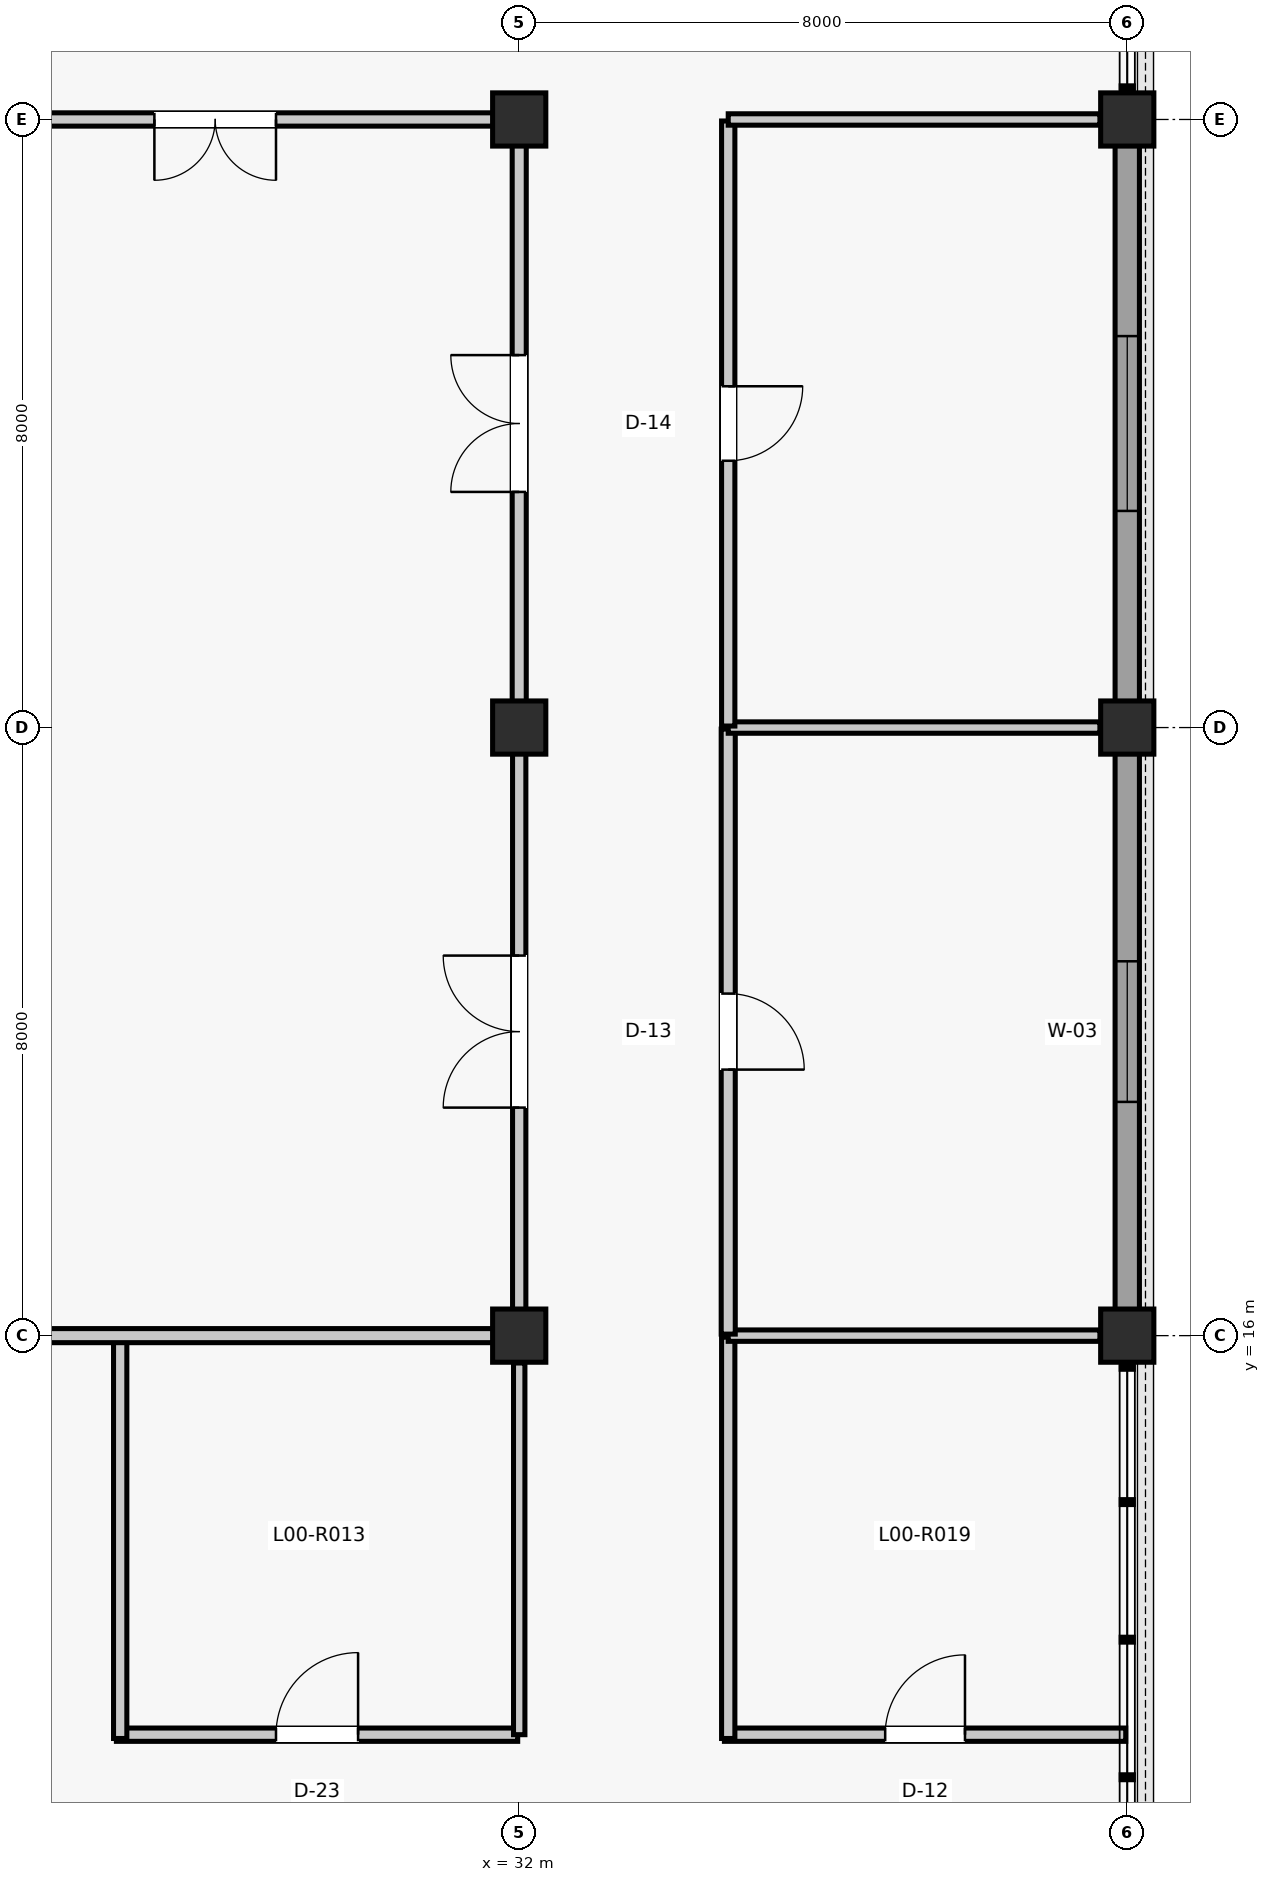
"""IFC4 building model, lengths in metres.
Left out: names, types, materials, properties, quantities, classifications, styles, units other than length and angle.
Written with IfcOpenShell. Run it as: python <this file> out.ifc"""

import sys

from ifc_helpers import new_model, si_unit, direction, frame, frame_2d, origin, origin_2d, place, context, subcontext, project, spatial, rectangle, extrude, element, fill, save


model = new_model("IFC4")
c1 = context("Model", 3, precision=1e-05, world=origin(), true_north=direction((0.0, 1.0)))
c2 = subcontext(c1, "Body", "Model", "MODEL_VIEW")
j1 = project(units=[si_unit("LENGTHUNIT", "METRE"), si_unit("PLANEANGLEUNIT", "RADIAN")], contexts=[c1])
p1 = place(None, origin())
s1 = spatial("IfcSite", under=j1, at=p1, CompositionType="ELEMENT")
p2 = place(p1, origin())
s2 = spatial("IfcBuilding", under=s1, at=p2, CompositionType="ELEMENT")
p3 = place(p2, origin())
s3 = spatial("IfcBuildingStorey", under=s2, at=p3, CompositionType="ELEMENT", Elevation=0.0)
for number, where, z_axis, x_axis in (
    (1, (32.0, 16.0, 0.0), (0.0, 0.0, 1.0), (1.0, 0.0, 0.0)),
    (2, (32.0, 24.0, 0.0), (0.0, 0.0, 1.0), (1.0, 0.0, 0.0)),
    (3, (32.0, 32.0, 0.0), (0.0, 0.0, 1.0), (1.0, 0.0, 0.0)),
    (4, (40.0, 16.0, 0.0), (0.0, 0.0, 1.0), (1.0, 0.0, 0.0)),
    (5, (40.0, 24.0, 0.0), (0.0, 0.0, 1.0), (1.0, 0.0, 0.0)),
    (6, (40.0, 32.0, 0.0), (0.0, 0.0, 1.0), (1.0, 0.0, 0.0)),
):
    element("IfcColumn", number, at=place(p3, frame(where, z_axis=z_axis, x_axis=x_axis)), inside=s3, PredefinedType="COLUMN", context=c2, shape_type="SweptSolid", body=[
        extrude(rectangle(XDim=0.7, YDim=0.7, at=origin_2d()), origin(), (0.0, 0.0, 1.0), 5.28),
    ])
p4 = place(p3, frame((40.0, 16.335, 0.0), z_axis=(0.0, 0.0, 1.0), x_axis=(0.0, 1.0, 0.0)))
e7 = element("IfcWall", 7, at=p4, inside=s3, PredefinedType="SOLIDWALL", context=c2, shape_type="SweptSolid", body=[
    extrude(rectangle(XDim=7.33, YDim=0.32, at=frame_2d((3.665, 0.0))), origin(), (0.0, 0.0, 1.0), 4.677),
])
p5 = place(p4, frame((2.74, 0.0, 0.9)))
e8 = element("IfcOpeningElement", 8, at=p5, cuts=e7, PredefinedType="OPENING", context=c2, shape_type="SweptSolid", body=[
    extrude(rectangle(XDim=1.85, YDim=2.65, at=frame_2d((0.925, 1.325))), frame((0.0, 0.17, 0.0), z_axis=(0.0, -1.0, 0.0), x_axis=(1.0, 0.0, 0.0)), (0.0, 0.0, 1.0), 0.34),
])
p6 = place(p3, frame((40.0, 24.335, 0.0), z_axis=(0.0, 0.0, 1.0), x_axis=(0.0, 1.0, 0.0)))
e9 = element("IfcWall", 9, at=p6, inside=s3, PredefinedType="SOLIDWALL", context=c2, shape_type="SweptSolid", body=[
    extrude(rectangle(XDim=7.33, YDim=0.32, at=frame_2d((3.665, 0.0))), origin(), (0.0, 0.0, 1.0), 4.61),
])
p7 = place(p6, frame((2.515, 0.0, 0.9)))
e10 = element("IfcOpeningElement", 10, at=p7, cuts=e9, PredefinedType="OPENING", context=c2, shape_type="SweptSolid", body=[
    extrude(rectangle(XDim=2.3, YDim=2.55, at=frame_2d((1.15, 1.275))), frame((0.0, 0.17, 0.0), z_axis=(0.0, -1.0, 0.0), x_axis=(1.0, 0.0, 0.0)), (0.0, 0.0, 1.0), 0.34),
])
p8 = place(p3, frame((26.7, 10.75, 0.0), z_axis=(0.0, 0.0, 1.0), x_axis=(1.0, 0.0, 0.0)))
e11 = element("IfcWall", 11, at=p8, inside=s3, PredefinedType="PARTITIONING", context=c2, shape_type="SweptSolid", body=[
    extrude(rectangle(XDim=5.28, YDim=0.175, at=frame_2d((2.64, 0.0))), origin(), (0.0, 0.0, 1.0), 4.412),
])
p9 = place(p8, frame((2.1, 0.0, 0.0)))
e12 = element("IfcOpeningElement", 12, at=p9, cuts=e11, PredefinedType="OPENING", context=c2, shape_type="SweptSolid", body=[
    extrude(rectangle(XDim=1.08, YDim=2.2, at=frame_2d((0.54, 1.1))), frame((0.0, 0.097, 0.0), z_axis=(0.0, -1.0, 0.0), x_axis=(1.0, 0.0, 0.0)), (0.0, 0.0, 1.0), 0.195),
])
p10 = place(p3, frame((26.75, 10.7, 0.0), z_axis=(0.0, 0.0, 1.0), x_axis=(0.0, 1.0, 0.0)))
e13 = element("IfcWall", 13, at=p10, inside=s3, PredefinedType="PARTITIONING", context=c2, shape_type="SweptSolid", body=[
    extrude(rectangle(XDim=5.28, YDim=0.175, at=frame_2d((2.64, 0.0))), origin(), (0.0, 0.0, 1.0), 4.667),
])
p11 = place(p3, frame((32.0, 10.75, 0.0), z_axis=(0.0, 0.0, 1.0), x_axis=(0.0, 1.0, 0.0)))
e14 = element("IfcWall", 14, at=p11, inside=s3, PredefinedType="PARTITIONING", context=c2, shape_type="SweptSolid", body=[
    extrude(rectangle(XDim=4.89, YDim=0.15, at=frame_2d((2.445, 0.0))), origin(), (0.0, 0.0, 1.0), 4.412),
])
p12 = place(p3, frame((34.7, 10.75, 0.0), z_axis=(0.0, 0.0, 1.0), x_axis=(1.0, 0.0, 0.0)))
e15 = element("IfcWall", 15, at=p12, inside=s3, PredefinedType="PARTITIONING", context=c2, shape_type="SweptSolid", body=[
    extrude(rectangle(XDim=5.28, YDim=0.175, at=frame_2d((2.64, 0.0))), origin(), (0.0, 0.0, 1.0), 4.607),
])
p13 = place(p12, frame((2.115, 0.0, 0.0)))
e16 = element("IfcOpeningElement", 16, at=p13, cuts=e15, PredefinedType="OPENING", context=c2, shape_type="SweptSolid", body=[
    extrude(rectangle(XDim=1.05, YDim=2.15, at=frame_2d((0.525, 1.075))), frame((0.0, 0.097, 0.0), z_axis=(0.0, -1.0, 0.0), x_axis=(1.0, 0.0, 0.0)), (0.0, 0.0, 1.0), 0.195),
])
p14 = place(p3, frame((34.75, 10.7, 0.0), z_axis=(0.0, 0.0, 1.0), x_axis=(0.0, 1.0, 0.0)))
e17 = element("IfcWall", 17, at=p14, inside=s3, PredefinedType="PARTITIONING", context=c2, shape_type="SweptSolid", body=[
    extrude(rectangle(XDim=5.28, YDim=0.175, at=frame_2d((2.64, 0.0))), origin(), (0.0, 0.0, 1.0), 4.336),
])
p15 = place(p3, frame((34.75, 16.0, 0.0), z_axis=(0.0, 0.0, 1.0), x_axis=(1.0, 0.0, 0.0)))
e18 = element("IfcWall", 18, at=p15, inside=s3, PredefinedType="PARTITIONING", context=c2, shape_type="SweptSolid", body=[
    extrude(rectangle(XDim=4.89, YDim=0.15, at=frame_2d((2.445, 0.0))), origin(), (0.0, 0.0, 1.0), 4.336),
])
p16 = place(p3, frame((34.75, 16.02, 0.0), z_axis=(0.0, 0.0, 1.0), x_axis=(0.0, 1.0, 0.0)))
e19 = element("IfcWall", 19, at=p16, inside=s3, PredefinedType="PARTITIONING", context=c2, shape_type="SweptSolid", body=[
    extrude(rectangle(XDim=7.96, YDim=0.185, at=frame_2d((3.98, 0.0))), origin(), (0.0, 0.0, 1.0), 4.336),
])
p17 = place(p16, frame((3.48, 0.0, 0.0)))
e20 = element("IfcOpeningElement", 20, at=p17, cuts=e19, PredefinedType="OPENING", context=c2, shape_type="SweptSolid", body=[
    extrude(rectangle(XDim=1.0, YDim=2.15, at=frame_2d((0.5, 1.075))), frame((0.0, 0.103, 0.0), z_axis=(0.0, -1.0, 0.0), x_axis=(1.0, 0.0, 0.0)), (0.0, 0.0, 1.0), 0.205),
])
p18 = place(p3, frame((34.75, 24.0, 0.0), z_axis=(0.0, 0.0, 1.0), x_axis=(1.0, 0.0, 0.0)))
e21 = element("IfcWall", 21, at=p18, inside=s3, PredefinedType="PARTITIONING", context=c2, shape_type="SweptSolid", body=[
    extrude(rectangle(XDim=4.89, YDim=0.15, at=frame_2d((2.445, 0.0))), origin(), (0.0, 0.0, 1.0), 4.404),
])
p19 = place(p3, frame((34.75, 24.02, 0.0), z_axis=(0.0, 0.0, 1.0), x_axis=(0.0, 1.0, 0.0)))
e22 = element("IfcWall", 22, at=p19, inside=s3, PredefinedType="PARTITIONING", context=c2, shape_type="SweptSolid", body=[
    extrude(rectangle(XDim=7.96, YDim=0.175, at=frame_2d((3.98, 0.0))), origin(), (0.0, 0.0, 1.0), 4.327),
])
p20 = place(p19, frame((3.49, 0.0, 0.0)))
e23 = element("IfcOpeningElement", 23, at=p20, cuts=e22, PredefinedType="OPENING", context=c2, shape_type="SweptSolid", body=[
    extrude(rectangle(XDim=0.98, YDim=2.15, at=frame_2d((0.49, 1.075))), frame((0.0, 0.097, 0.0), z_axis=(0.0, -1.0, 0.0), x_axis=(1.0, 0.0, 0.0)), (0.0, 0.0, 1.0), 0.195),
])
p21 = place(p3, frame((34.75, 32.0, 0.0), z_axis=(0.0, 0.0, 1.0), x_axis=(1.0, 0.0, 0.0)))
e24 = element("IfcWall", 24, at=p21, inside=s3, PredefinedType="PARTITIONING", context=c2, shape_type="SweptSolid", body=[
    extrude(rectangle(XDim=4.89, YDim=0.15, at=frame_2d((2.445, 0.0))), origin(), (0.0, 0.0, 1.0), 4.327),
])
p22 = place(p3, frame((24.34, 16.0, 0.0), z_axis=(0.0, 0.0, 1.0), x_axis=(1.0, 0.0, 0.0)))
e25 = element("IfcWall", 25, at=p22, inside=s3, PredefinedType="PARTITIONING", context=c2, shape_type="SweptSolid", body=[
    extrude(rectangle(XDim=7.32, YDim=0.185, at=frame_2d((3.66, 0.0))), origin(), (0.0, 0.0, 1.0), 4.667),
])
p23 = place(p22, frame((0.52, 0.0, 0.0)))
e26 = element("IfcOpeningElement", 26, at=p23, cuts=e25, PredefinedType="OPENING", context=c2, shape_type="SweptSolid", body=[
    extrude(rectangle(XDim=0.94, YDim=2.12, at=frame_2d((0.47, 1.06))), frame((0.0, 0.103, 0.0), z_axis=(0.0, -1.0, 0.0), x_axis=(1.0, 0.0, 0.0)), (0.0, 0.0, 1.0), 0.205),
])
p24 = place(p3, frame((32.0, 16.34, 0.0), z_axis=(0.0, 0.0, 1.0), x_axis=(0.0, 1.0, 0.0)))
e27 = element("IfcWall", 27, at=p24, inside=s3, PredefinedType="PARTITIONING", context=c2, shape_type="SweptSolid", body=[
    extrude(rectangle(XDim=7.32, YDim=0.175, at=frame_2d((3.66, 0.0))), origin(), (0.0, 0.0, 1.0), 4.607),
])
p25 = place(p24, frame((2.66, 0.0, 0.0)))
e28 = element("IfcOpeningElement", 28, at=p25, cuts=e27, PredefinedType="OPENING", context=c2, shape_type="SweptSolid", body=[
    extrude(rectangle(XDim=2.0, YDim=2.4, at=frame_2d((1.0, 1.2))), frame((0.0, 0.097, 0.0), z_axis=(0.0, -1.0, 0.0), x_axis=(1.0, 0.0, 0.0)), (0.0, 0.0, 1.0), 0.195),
])
p26 = place(p3, frame((32.0, 24.34, 0.0), z_axis=(0.0, 0.0, 1.0), x_axis=(0.0, 1.0, 0.0)))
e29 = element("IfcWall", 29, at=p26, inside=s3, PredefinedType="PARTITIONING", context=c2, shape_type="SweptSolid", body=[
    extrude(rectangle(XDim=7.32, YDim=0.185, at=frame_2d((3.66, 0.0))), origin(), (0.0, 0.0, 1.0), 4.67),
])
p27 = place(p26, frame((2.76, 0.0, 0.0)))
e30 = element("IfcOpeningElement", 30, at=p27, cuts=e29, PredefinedType="OPENING", context=c2, shape_type="SweptSolid", body=[
    extrude(rectangle(XDim=1.8, YDim=2.35, at=frame_2d((0.9, 1.175))), frame((0.0, 0.103, 0.0), z_axis=(0.0, -1.0, 0.0), x_axis=(1.0, 0.0, 0.0)), (0.0, 0.0, 1.0), 0.205),
])
p28 = place(p3, frame((24.34, 32.0, 0.0), z_axis=(0.0, 0.0, 1.0), x_axis=(1.0, 0.0, 0.0)))
e31 = element("IfcWall", 31, at=p28, inside=s3, PredefinedType="PARTITIONING", context=c2, shape_type="SweptSolid", body=[
    extrude(rectangle(XDim=7.32, YDim=0.175, at=frame_2d((3.66, 0.0))), origin(), (0.0, 0.0, 1.0), 4.67),
])
p29 = place(p28, frame((2.86, 0.0, 0.0)))
e32 = element("IfcOpeningElement", 32, at=p29, cuts=e31, PredefinedType="OPENING", context=c2, shape_type="SweptSolid", body=[
    extrude(rectangle(XDim=1.6, YDim=2.25, at=frame_2d((0.8, 1.125))), frame((0.0, 0.097, 0.0), z_axis=(0.0, -1.0, 0.0), x_axis=(1.0, 0.0, 0.0)), (0.0, 0.0, 1.0), 0.195),
])
p30 = place(p5, origin())
e33 = element("IfcWindow", 33, at=p30, inside=s3, PartitioningType="SINGLE_PANEL", PredefinedType="WINDOW", context=c2, shape_type="SweptSolid", body=[
    extrude(rectangle(XDim=1.85, YDim=2.65, at=frame_2d((0.925, 1.325))), frame((0.0, 0.03, 0.0), z_axis=(0.0, -1.0, 0.0), x_axis=(1.0, 0.0, 0.0)), (0.0, 0.0, 1.0), 0.06),
])
fill(e8, e33)
p31 = place(p7, origin())
e34 = element("IfcWindow", 34, at=p31, inside=s3, PartitioningType="SINGLE_PANEL", PredefinedType="WINDOW", context=c2, shape_type="SweptSolid", body=[
    extrude(rectangle(XDim=2.3, YDim=2.55, at=frame_2d((1.15, 1.275))), frame((0.0, 0.03, 0.0), z_axis=(0.0, -1.0, 0.0), x_axis=(1.0, 0.0, 0.0)), (0.0, 0.0, 1.0), 0.06),
])
fill(e10, e34)
p32 = place(p9, origin())
e35 = element("IfcDoor", 35, at=p32, inside=s3, OperationType="SINGLE_SWING_RIGHT", PredefinedType="DOOR", context=c2, shape_type="SweptSolid", body=[
    extrude(rectangle(XDim=1.08, YDim=2.2, at=frame_2d((0.54, 1.1))), frame((0.0, 0.025, 0.0), z_axis=(0.0, -1.0, 0.0), x_axis=(1.0, 0.0, 0.0)), (0.0, 0.0, 1.0), 0.05),
])
fill(e12, e35)
p33 = place(p13, origin())
e36 = element("IfcDoor", 36, at=p33, inside=s3, OperationType="SINGLE_SWING_RIGHT", PredefinedType="DOOR", context=c2, shape_type="SweptSolid", body=[
    extrude(rectangle(XDim=1.05, YDim=2.15, at=frame_2d((0.525, 1.075))), frame((0.0, 0.025, 0.0), z_axis=(0.0, -1.0, 0.0), x_axis=(1.0, 0.0, 0.0)), (0.0, 0.0, 1.0), 0.05),
])
fill(e16, e36)
p34 = place(p17, frame((1.0, 0.0, 0.0), z_axis=(0.0, 0.0, 1.0), x_axis=(-1.0, 0.0, 0.0)))
e37 = element("IfcDoor", 37, at=p34, inside=s3, OperationType="SINGLE_SWING_LEFT", PredefinedType="DOOR", context=c2, shape_type="SweptSolid", body=[
    extrude(rectangle(XDim=1.0, YDim=2.15, at=frame_2d((0.5, 1.075))), frame((0.0, 0.025, 0.0), z_axis=(0.0, -1.0, 0.0), x_axis=(1.0, 0.0, 0.0)), (0.0, 0.0, 1.0), 0.05),
])
fill(e20, e37)
p35 = place(p20, frame((0.98, 0.0, 0.0), z_axis=(0.0, 0.0, 1.0), x_axis=(-1.0, 0.0, 0.0)))
e38 = element("IfcDoor", 38, at=p35, inside=s3, OperationType="SINGLE_SWING_RIGHT", PredefinedType="DOOR", context=c2, shape_type="SweptSolid", body=[
    extrude(rectangle(XDim=0.98, YDim=2.15, at=frame_2d((0.49, 1.075))), frame((0.0, 0.025, 0.0), z_axis=(0.0, -1.0, 0.0), x_axis=(1.0, 0.0, 0.0)), (0.0, 0.0, 1.0), 0.05),
])
fill(e23, e38)
p36 = place(p25, origin())
e39 = element("IfcDoor", 39, at=p36, inside=s3, OperationType="DOUBLE_DOOR_SINGLE_SWING", PredefinedType="DOOR", context=c2, shape_type="SweptSolid", body=[
    extrude(rectangle(XDim=2.0, YDim=2.4, at=frame_2d((1.0, 1.2))), frame((0.0, 0.025, 0.0), z_axis=(0.0, -1.0, 0.0), x_axis=(1.0, 0.0, 0.0)), (0.0, 0.0, 1.0), 0.05),
])
fill(e28, e39)
p37 = place(p27, origin())
e40 = element("IfcDoor", 40, at=p37, inside=s3, OperationType="DOUBLE_DOOR_SINGLE_SWING", PredefinedType="DOOR", context=c2, shape_type="SweptSolid", body=[
    extrude(rectangle(XDim=1.8, YDim=2.35, at=frame_2d((0.9, 1.175))), frame((0.0, 0.025, 0.0), z_axis=(0.0, -1.0, 0.0), x_axis=(1.0, 0.0, 0.0)), (0.0, 0.0, 1.0), 0.05),
])
fill(e30, e40)
p38 = place(p29, frame((1.6, 0.0, 0.0), z_axis=(0.0, 0.0, 1.0), x_axis=(-1.0, 0.0, 0.0)))
e41 = element("IfcDoor", 41, at=p38, inside=s3, OperationType="DOUBLE_DOOR_SINGLE_SWING", PredefinedType="DOOR", context=c2, shape_type="SweptSolid", body=[
    extrude(rectangle(XDim=1.6, YDim=2.25, at=frame_2d((0.8, 1.125))), frame((0.0, 0.025, 0.0), z_axis=(0.0, -1.0, 0.0), x_axis=(1.0, 0.0, 0.0)), (0.0, 0.0, 1.0), 0.05),
])
fill(e32, e41)
save(model, sys.argv[1])
